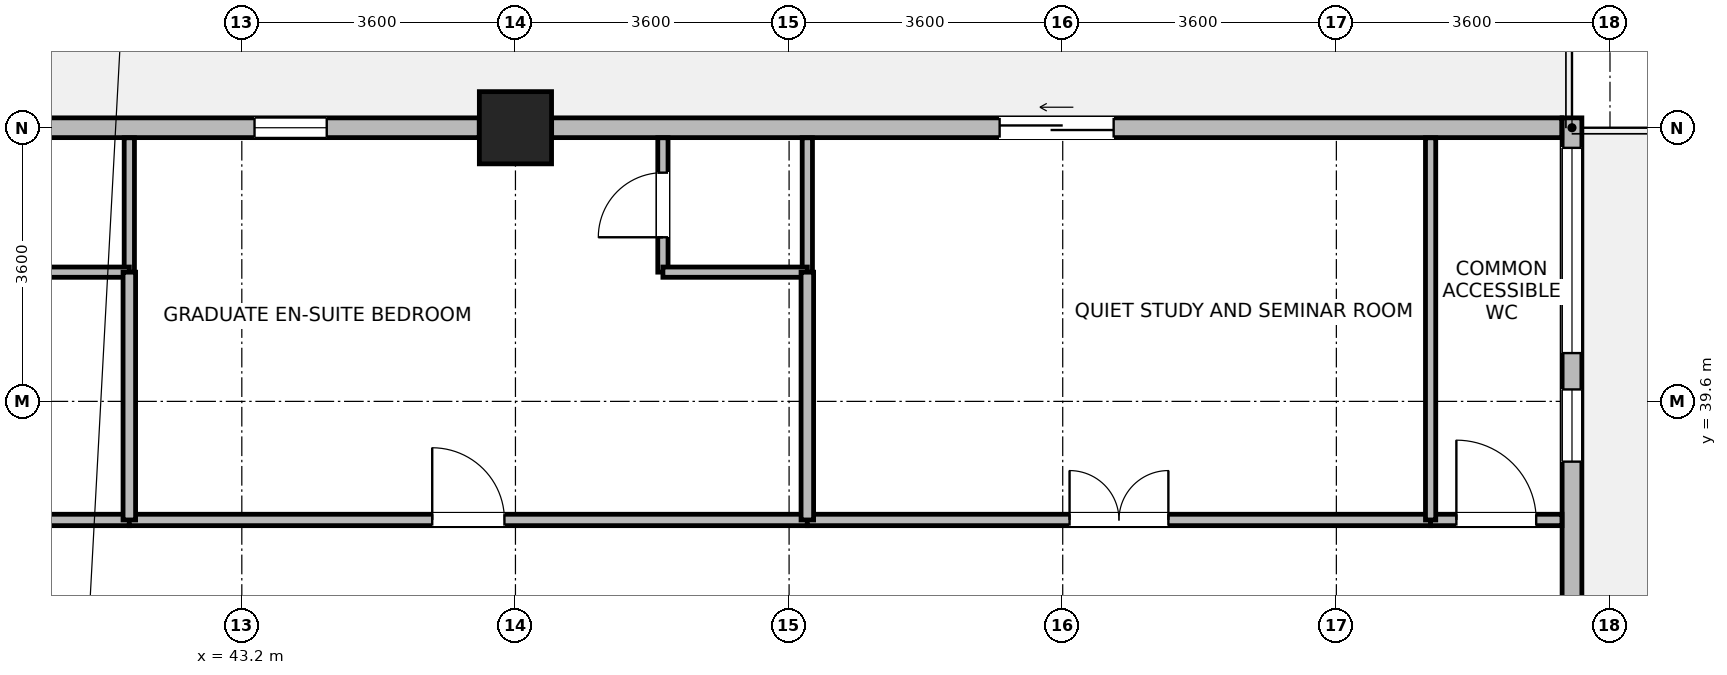
"""IFC4 building model, lengths in metres.
Left out: names, types, materials, properties, quantities, classifications, styles, units other than length and angle.
Written with IfcOpenShell. Run it as: python <this file> out.ifc"""

import sys

from ifc_helpers import new_model, si_unit, direction, frame, frame_2d, origin, origin_2d, place, context, subcontext, project, spatial, rectangle, extrude, source, transform, mapped, element, fill, save


model = new_model("IFC4")
c1 = context("Model", 3, precision=1e-05, world=origin(), true_north=direction((0.0, 1.0)))
c2 = subcontext(c1, "Body", "Model", "MODEL_VIEW")
j1 = project(units=[si_unit("LENGTHUNIT", "METRE"), si_unit("PLANEANGLEUNIT", "RADIAN")], contexts=[c1])
p1 = place(None, origin())
s1 = spatial("IfcSite", under=j1, at=p1, CompositionType="ELEMENT")
p2 = place(p1, origin())
s2 = spatial("IfcBuilding", under=s1, at=p2, CompositionType="ELEMENT")
p3 = place(p2, frame((0.0, 0.0, 197.2)))
s3 = spatial("IfcBuildingStorey", under=s2, at=p3, CompositionType="ELEMENT", Elevation=197.2)
m1 = source(origin(), c2, "Body", "SweptSolid", [
    extrude(rectangle(XDim=0.95, YDim=0.95, at=origin_2d()), origin(), (0.0, 0.0, 1.0), 4.6),
])
p4 = place(p3, frame((46.8, 43.2, 0.0), z_axis=(0.0, 0.0, 1.0), x_axis=(1.0, 0.0, 0.0)))
e1 = element("IfcColumn", 1, at=p4, inside=s3, PredefinedType="COLUMN", context=c2, shape_type="MappedRepresentation", body=[
    mapped(m1, transform((0.0, 0.0, 0.0), x_axis=(1.0, 0.0, 0.0), y_axis=(0.0, 1.0, 0.0), z_axis=(0.0, 0.0, 1.0), scale=1.0)),
])
p5 = place(p3, frame((60.7, 43.33, 0.0), z_axis=(0.0, 0.0, 1.0), x_axis=(0.0, -1.0, 0.0)))
e2 = element("IfcWall", 2, at=p5, inside=s3, PredefinedType="STANDARD", context=c2, shape_type="SweptSolid", body=[
    extrude(rectangle(XDim=6.979, YDim=0.26, at=frame_2d((3.49, 0.0))), origin(), (0.0, 0.0, 1.0), 4.35),
])
p6 = place(p5, frame((0.395, 0.0, 0.85)))
e3 = element("IfcOpeningElement", 3, at=p6, cuts=e2, PredefinedType="OPENING", context=c2, shape_type="SweptSolid", body=[
    extrude(rectangle(XDim=2.7, YDim=2.05, at=frame_2d((1.35, 1.025))), frame((0.0, 0.14, 0.0), z_axis=(0.0, -1.0, 0.0), x_axis=(1.0, 0.0, 0.0)), (0.0, 0.0, 1.0), 0.28),
])
p7 = place(p5, frame((3.573, 0.0, 0.85)))
e4 = element("IfcOpeningElement", 4, at=p7, cuts=e2, PredefinedType="OPENING", context=c2, shape_type="SweptSolid", body=[
    extrude(rectangle(XDim=0.95, YDim=1.75, at=frame_2d((0.475, 0.875))), frame((0.0, 0.14, 0.0), z_axis=(0.0, -1.0, 0.0), x_axis=(1.0, 0.0, 0.0)), (0.0, 0.0, 1.0), 0.28),
])
p8 = place(p3, frame((47.276, 43.2, 0.0), z_axis=(0.0, 0.0, 1.0), x_axis=(1.0, 0.0, 0.0)))
e5 = element("IfcWall", 5, at=p8, inside=s3, PredefinedType="STANDARD", context=c2, shape_type="SweptSolid", body=[
    extrude(rectangle(XDim=13.289, YDim=0.26, at=frame_2d((6.645, 0.0))), origin(), (0.0, 0.0, 1.0), 4.35),
])
p9 = place(p8, frame((5.894, 0.0, 0.0)))
e6 = element("IfcOpeningElement", 6, at=p9, cuts=e5, PredefinedType="OPENING", context=c2, shape_type="SweptSolid", body=[
    extrude(rectangle(XDim=1.5, YDim=2.15, at=frame_2d((0.75, 1.075))), frame((0.0, 0.14, 0.0), z_axis=(0.0, -1.0, 0.0), x_axis=(1.0, 0.0, 0.0)), (0.0, 0.0, 1.0), 0.28),
])
p10 = place(p3, frame((36.476, 43.2, 0.0), z_axis=(0.0, 0.0, 1.0), x_axis=(1.0, 0.0, 0.0)))
e7 = element("IfcWall", 7, at=p10, inside=s3, PredefinedType="STANDARD", context=c2, shape_type="SweptSolid", body=[
    extrude(rectangle(XDim=9.848, YDim=0.26, at=frame_2d((4.924, 0.0))), origin(), (0.0, 0.0, 1.0), 3.9),
])
p11 = place(p10, frame((2.007, 0.0, 0.85)))
e8 = element("IfcOpeningElement", 8, at=p11, cuts=e7, PredefinedType="OPENING", context=c2, shape_type="SweptSolid", body=[
    extrude(rectangle(XDim=0.95, YDim=1.75, at=frame_2d((0.475, 0.875))), frame((0.0, 0.14, 0.0), z_axis=(0.0, -1.0, 0.0), x_axis=(1.0, 0.0, 0.0)), (0.0, 0.0, 1.0), 0.28),
])
p12 = place(p10, frame((6.891, 0.0, 0.85)))
e9 = element("IfcOpeningElement", 9, at=p12, cuts=e7, PredefinedType="OPENING", context=c2, shape_type="SweptSolid", body=[
    extrude(rectangle(XDim=0.95, YDim=1.75, at=frame_2d((0.475, 0.875))), frame((0.0, 0.14, 0.0), z_axis=(0.0, -1.0, 0.0), x_axis=(1.0, 0.0, 0.0)), (0.0, 0.0, 1.0), 0.28),
])
p13 = place(p3, frame((41.72, 41.3, 0.0), z_axis=(0.0, 0.0, 1.0), x_axis=(0.0, 1.0, 0.0)))
e10 = element("IfcWall", 10, at=p13, inside=s3, PredefinedType="PARTITIONING", context=c2, shape_type="SweptSolid", body=[
    extrude(rectangle(XDim=1.768, YDim=0.135, at=frame_2d((0.884, 0.0))), origin(), (0.0, 0.0, 1.0), 4.35),
])
p14 = place(p3, frame((48.74, 41.3, 0.0), z_axis=(0.0, 0.0, 1.0), x_axis=(0.0, 1.0, 0.0)))
e11 = element("IfcWall", 11, at=p14, inside=s3, PredefinedType="PARTITIONING", context=c2, shape_type="SweptSolid", body=[
    extrude(rectangle(XDim=1.768, YDim=0.135, at=frame_2d((0.884, 0.0))), origin(), (0.0, 0.0, 1.0), 4.35),
])
p15 = place(p14, frame((0.459, 0.0, 0.0)))
e12 = element("IfcOpeningElement", 12, at=p15, cuts=e11, PredefinedType="OPENING", context=c2, shape_type="SweptSolid", body=[
    extrude(rectangle(XDim=0.85, YDim=2.04, at=frame_2d((0.425, 1.02))), frame((0.0, 0.078, 0.0), z_axis=(0.0, -1.0, 0.0), x_axis=(1.0, 0.0, 0.0)), (0.0, 0.0, 1.0), 0.155),
])
p16 = place(p3, frame((50.64, 41.3, 0.0), z_axis=(0.0, 0.0, 1.0), x_axis=(0.0, 1.0, 0.0)))
e13 = element("IfcWall", 13, at=p16, inside=s3, PredefinedType="PARTITIONING", context=c2, shape_type="SweptSolid", body=[
    extrude(rectangle(XDim=1.768, YDim=0.135, at=frame_2d((0.884, 0.0))), origin(), (0.0, 0.0, 1.0), 4.35),
])
for number, where, z_axis, x_axis in (
    (14, (39.82, 41.3, 0.0), (0.0, 0.0, 1.0), (1.0, 0.0, 0.0)),
    (15, (48.74, 41.3, 0.0), (0.0, 0.0, 1.0), (1.0, 0.0, 0.0)),
):
    element("IfcWall", number, at=place(p3, frame(where, z_axis=z_axis, x_axis=x_axis)), inside=s3, PredefinedType="PARTITIONING", context=c2, shape_type="SweptSolid", body=[
        extrude(rectangle(XDim=1.9, YDim=0.135, at=frame_2d((0.95, 0.0))), origin(), (0.0, 0.0, 1.0), 4.35),
    ])
p17 = place(p3, frame((30.96, 38.04, 0.0), z_axis=(0.0, 0.0, 1.0), x_axis=(1.0, 0.0, 0.0)))
e16 = element("IfcWall", 16, at=p17, inside=s3, PredefinedType="PARTITIONING", context=c2, shape_type="SweptSolid", body=[
    extrude(rectangle(XDim=10.76, YDim=0.15, at=frame_2d((5.38, 0.0))), origin(), (0.0, 0.0, 1.0), 4.35),
])
p18 = place(p17, frame((4.855, 0.0, 0.0)))
e17 = element("IfcOpeningElement", 17, at=p18, cuts=e16, PredefinedType="OPENING", context=c2, shape_type="SweptSolid", body=[
    extrude(rectangle(XDim=1.05, YDim=2.12, at=frame_2d((0.525, 1.06))), frame((0.0, 0.085, 0.0), z_axis=(0.0, -1.0, 0.0), x_axis=(1.0, 0.0, 0.0)), (0.0, 0.0, 1.0), 0.17),
])
p19 = place(p3, frame((41.72, 38.04, 0.0), z_axis=(0.0, 0.0, 1.0), x_axis=(1.0, 0.0, 0.0)))
e18 = element("IfcWall", 18, at=p19, inside=s3, PredefinedType="PARTITIONING", context=c2, shape_type="SweptSolid", body=[
    extrude(rectangle(XDim=8.92, YDim=0.15, at=frame_2d((4.46, 0.0))), origin(), (0.0, 0.0, 1.0), 4.35),
])
p20 = place(p19, frame((3.985, 0.0, 0.0)))
e19 = element("IfcOpeningElement", 19, at=p20, cuts=e18, PredefinedType="OPENING", context=c2, shape_type="SweptSolid", body=[
    extrude(rectangle(XDim=0.95, YDim=2.1, at=frame_2d((0.475, 1.05))), frame((0.0, 0.085, 0.0), z_axis=(0.0, -1.0, 0.0), x_axis=(1.0, 0.0, 0.0)), (0.0, 0.0, 1.0), 0.17),
])
p21 = place(p3, frame((50.64, 38.04, 0.0), z_axis=(0.0, 0.0, 1.0), x_axis=(1.0, 0.0, 0.0)))
e20 = element("IfcWall", 20, at=p21, inside=s3, PredefinedType="PARTITIONING", context=c2, shape_type="SweptSolid", body=[
    extrude(rectangle(XDim=8.2, YDim=0.15, at=frame_2d((4.1, 0.0))), origin(), (0.0, 0.0, 1.0), 4.35),
])
p22 = place(p21, frame((3.45, 0.0, 0.0)))
e21 = element("IfcOpeningElement", 21, at=p22, cuts=e20, PredefinedType="OPENING", context=c2, shape_type="SweptSolid", body=[
    extrude(rectangle(XDim=1.3, YDim=2.12, at=frame_2d((0.65, 1.06))), frame((0.0, 0.085, 0.0), z_axis=(0.0, -1.0, 0.0), x_axis=(1.0, 0.0, 0.0)), (0.0, 0.0, 1.0), 0.17),
])
p23 = place(p3, frame((58.84, 38.04, 0.0), z_axis=(0.0, 0.0, 1.0), x_axis=(1.0, 0.0, 0.0)))
e22 = element("IfcWall", 22, at=p23, inside=s3, PredefinedType="PARTITIONING", context=c2, shape_type="SweptSolid", body=[
    extrude(rectangle(XDim=1.728, YDim=0.15, at=frame_2d((0.864, 0.0))), origin(), (0.0, 0.0, 1.0), 4.35),
])
p24 = place(p23, frame((0.339, 0.0, 0.0)))
e23 = element("IfcOpeningElement", 23, at=p24, cuts=e22, PredefinedType="OPENING", context=c2, shape_type="SweptSolid", body=[
    extrude(rectangle(XDim=1.05, YDim=2.12, at=frame_2d((0.525, 1.06))), frame((0.0, 0.085, 0.0), z_axis=(0.0, -1.0, 0.0), x_axis=(1.0, 0.0, 0.0)), (0.0, 0.0, 1.0), 0.17),
])
p25 = place(p3, frame((58.84, 38.04, 0.0), z_axis=(0.0, 0.0, 1.0), x_axis=(0.0, 1.0, 0.0)))
e24 = element("IfcWall", 24, at=p25, inside=s3, PredefinedType="PARTITIONING", context=c2, shape_type="SweptSolid", body=[
    extrude(rectangle(XDim=5.028, YDim=0.135, at=frame_2d((2.514, 0.0))), origin(), (0.0, 0.0, 1.0), 4.35),
])
for number, where, z_axis, x_axis in (
    (25, (41.72, 38.04, 0.0), (0.0, 0.0, 1.0), (0.0, 1.0, 0.0)),
    (26, (50.64, 38.04, 0.0), (0.0, 0.0, 1.0), (0.0, 1.0, 0.0)),
):
    element("IfcWall", number, at=place(p3, frame(where, z_axis=z_axis, x_axis=x_axis)), inside=s3, PredefinedType="PARTITIONING", context=c2, shape_type="SweptSolid", body=[
        extrude(rectangle(XDim=3.26, YDim=0.165, at=frame_2d((1.63, 0.0))), origin(), (0.0, 0.0, 1.0), 4.35),
    ])
p26 = place(p6, origin())
e27 = element("IfcWindow", 27, at=p26, inside=s3, PartitioningType="SINGLE_PANEL", PredefinedType="WINDOW", context=c2, shape_type="SweptSolid", body=[
    extrude(rectangle(XDim=2.7, YDim=2.05, at=frame_2d((1.35, 1.025))), frame((0.0, 0.03, 0.0), z_axis=(0.0, -1.0, 0.0), x_axis=(1.0, 0.0, 0.0)), (0.0, 0.0, 1.0), 0.06),
])
fill(e3, e27)
p27 = place(p7, origin())
e28 = element("IfcWindow", 28, at=p27, inside=s3, PartitioningType="SINGLE_PANEL", PredefinedType="WINDOW", context=c2, shape_type="SweptSolid", body=[
    extrude(rectangle(XDim=0.95, YDim=1.75, at=frame_2d((0.475, 0.875))), frame((0.0, 0.03, 0.0), z_axis=(0.0, -1.0, 0.0), x_axis=(1.0, 0.0, 0.0)), (0.0, 0.0, 1.0), 0.06),
])
fill(e4, e28)
p28 = place(p9, origin())
e29 = element("IfcDoor", 29, at=p28, inside=s3, OperationType="SLIDING_TO_LEFT", PredefinedType="DOOR", context=c2, shape_type="SweptSolid", body=[
    extrude(rectangle(XDim=1.5, YDim=2.15, at=frame_2d((0.75, 1.075))), frame((0.0, 0.025, 0.0), z_axis=(0.0, -1.0, 0.0), x_axis=(1.0, 0.0, 0.0)), (0.0, 0.0, 1.0), 0.05),
])
fill(e6, e29)
p29 = place(p12, origin())
e30 = element("IfcWindow", 30, at=p29, inside=s3, PartitioningType="SINGLE_PANEL", PredefinedType="WINDOW", context=c2, shape_type="SweptSolid", body=[
    extrude(rectangle(XDim=0.95, YDim=1.75, at=frame_2d((0.475, 0.875))), frame((0.0, 0.03, 0.0), z_axis=(0.0, -1.0, 0.0), x_axis=(1.0, 0.0, 0.0)), (0.0, 0.0, 1.0), 0.06),
])
fill(e9, e30)
p30 = place(p15, origin())
e31 = element("IfcDoor", 31, at=p30, inside=s3, OperationType="SINGLE_SWING_LEFT", PredefinedType="DOOR", context=c2, shape_type="SweptSolid", body=[
    extrude(rectangle(XDim=0.85, YDim=2.04, at=frame_2d((0.425, 1.02))), frame((0.0, 0.025, 0.0), z_axis=(0.0, -1.0, 0.0), x_axis=(1.0, 0.0, 0.0)), (0.0, 0.0, 1.0), 0.05),
])
fill(e12, e31)
p31 = place(p20, origin())
e32 = element("IfcDoor", 32, at=p31, inside=s3, OperationType="SINGLE_SWING_LEFT", PredefinedType="DOOR", context=c2, shape_type="SweptSolid", body=[
    extrude(rectangle(XDim=0.95, YDim=2.1, at=frame_2d((0.475, 1.05))), frame((0.0, 0.025, 0.0), z_axis=(0.0, -1.0, 0.0), x_axis=(1.0, 0.0, 0.0)), (0.0, 0.0, 1.0), 0.05),
])
fill(e19, e32)
p32 = place(p22, origin())
e33 = element("IfcDoor", 33, at=p32, inside=s3, OperationType="DOUBLE_DOOR_SINGLE_SWING", PredefinedType="DOOR", context=c2, shape_type="SweptSolid", body=[
    extrude(rectangle(XDim=1.3, YDim=2.12, at=frame_2d((0.65, 1.06))), frame((0.0, 0.025, 0.0), z_axis=(0.0, -1.0, 0.0), x_axis=(1.0, 0.0, 0.0)), (0.0, 0.0, 1.0), 0.05),
])
fill(e21, e33)
p33 = place(p24, origin())
e34 = element("IfcDoor", 34, at=p33, inside=s3, OperationType="SINGLE_SWING_LEFT", PredefinedType="DOOR", context=c2, shape_type="SweptSolid", body=[
    extrude(rectangle(XDim=1.05, YDim=2.12, at=frame_2d((0.525, 1.06))), frame((0.0, 0.025, 0.0), z_axis=(0.0, -1.0, 0.0), x_axis=(1.0, 0.0, 0.0)), (0.0, 0.0, 1.0), 0.05),
])
fill(e23, e34)
save(model, sys.argv[1])
